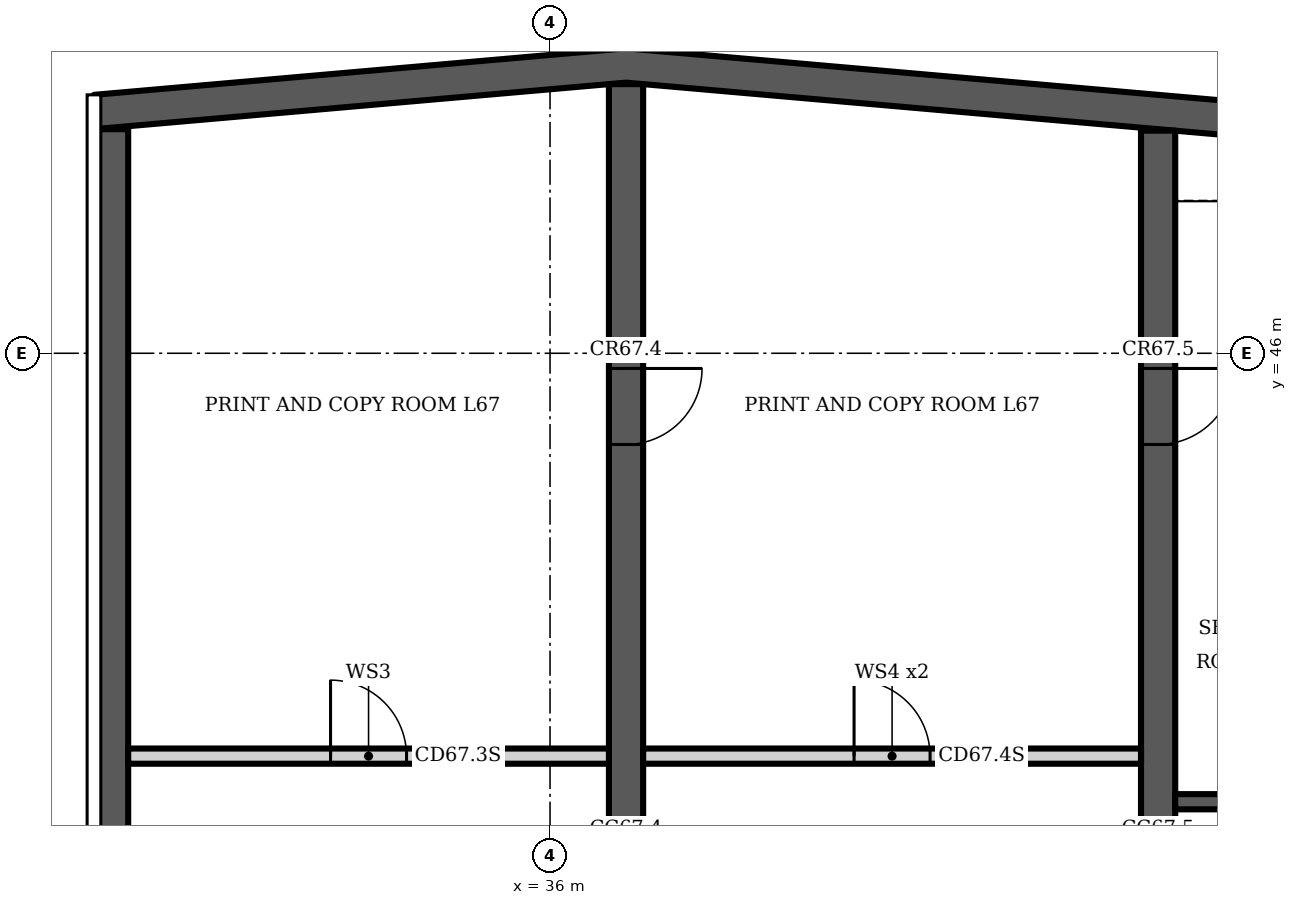
"""IFC4 building model, lengths in metres.
Left out: names, types, materials, properties, quantities, classifications, styles, units other than length and angle.
Written with IfcOpenShell. Run it as: python <this file> out.ifc"""

import sys

from ifc_helpers import new_model, si_unit, direction, frame, frame_2d, origin, place, context, subcontext, project, spatial, polyline, rectangle, outline, extrude, element, fill, save


model = new_model("IFC4")
c1 = context("Model", 3, precision=1e-05, world=origin(), true_north=direction((0.0, 1.0)))
c2 = subcontext(c1, "Body", "Model", "MODEL_VIEW")
j1 = project(units=[si_unit("LENGTHUNIT", "METRE"), si_unit("PLANEANGLEUNIT", "RADIAN")], contexts=[c1])
p1 = place(None, origin())
s1 = spatial("IfcSite", under=j1, at=p1, CompositionType="ELEMENT")
p2 = place(p1, origin())
s2 = spatial("IfcBuilding", under=s1, at=p2, CompositionType="ELEMENT")
p3 = place(p2, frame((0.0, 0.0, 264.3)))
s3 = spatial("IfcBuildingStorey", under=s2, at=p3, CompositionType="ELEMENT", Elevation=264.3)
p4 = place(p3, frame((0.0, 0.0, -0.0)))
e1 = element("IfcWall", 1, at=p4, inside=s3, PredefinedType="SHEAR", context=c2, shape_type="SweptSolid", body=[
    extrude(outline(polyline([(30.0, 48.948), (37.0, 49.561), (51.0, 48.336), (51.0, 48.787), (37.0, 50.012), (30.0, 49.4), (30.0, 48.948)])), origin(), (0.0, 0.0, 1.0), 1.994),
])
p5 = place(p3, frame((30.225, 34.45, 0.0), z_axis=(0.0, 0.0, 1.0), x_axis=(0.0, 1.0, 0.0)))
e2 = element("IfcWall", 2, at=p5, inside=s3, PredefinedType="SHEAR", context=c2, shape_type="SweptSolid", body=[
    extrude(rectangle(XDim=14.498, YDim=0.45, at=frame_2d((7.249, 0.0))), origin(), (0.0, 0.0, 1.0), 2.085),
])
p6 = place(p3, frame((37.0, 34.45, 0.0), z_axis=(0.0, 0.0, 1.0), x_axis=(0.0, 1.0, 0.0)))
e3 = element("IfcWall", 3, at=p6, inside=s3, PredefinedType="SHEAR", context=c2, shape_type="SweptSolid", body=[
    extrude(rectangle(XDim=15.091, YDim=0.45, at=frame_2d((7.545, 0.0))), origin(), (0.0, 0.0, 1.0), 3.2),
])
p7 = place(p6, frame((3.95, 0.0, 0.0)))
e4 = element("IfcOpeningElement", 4, at=p7, cuts=e3, PredefinedType="OPENING", context=c2, shape_type="SweptSolid", body=[
    extrude(rectangle(XDim=1.1, YDim=2.1, at=frame_2d((0.55, 1.05))), frame((0.0, 0.235, 0.0), z_axis=(0.0, -1.0, 0.0), x_axis=(1.0, 0.0, 0.0)), (0.0, 0.0, 1.0), 0.47),
])
p8 = place(p6, frame((10.35, 0.0, 0.0)))
e5 = element("IfcOpeningElement", 5, at=p8, cuts=e3, PredefinedType="OPENING", context=c2, shape_type="SweptSolid", body=[
    extrude(rectangle(XDim=1.0, YDim=2.1, at=frame_2d((0.5, 1.05))), frame((0.0, 0.235, 0.0), z_axis=(0.0, -1.0, 0.0), x_axis=(1.0, 0.0, 0.0)), (0.0, 0.0, 1.0), 0.47),
])
p9 = place(p3, frame((44.0, 34.45, 0.0), z_axis=(0.0, 0.0, 1.0), x_axis=(0.0, 1.0, 0.0)))
e6 = element("IfcWall", 6, at=p9, inside=s3, PredefinedType="SHEAR", context=c2, shape_type="SweptSolid", body=[
    extrude(rectangle(XDim=14.479, YDim=0.45, at=frame_2d((7.239, 0.0))), origin(), (0.0, 0.0, 1.0), 3.2),
])
p10 = place(p9, frame((3.95, 0.0, 0.0)))
e7 = element("IfcOpeningElement", 7, at=p10, cuts=e6, PredefinedType="OPENING", context=c2, shape_type="SweptSolid", body=[
    extrude(rectangle(XDim=1.1, YDim=2.1, at=frame_2d((0.55, 1.05))), frame((0.0, 0.235, 0.0), z_axis=(0.0, -1.0, 0.0), x_axis=(1.0, 0.0, 0.0)), (0.0, 0.0, 1.0), 0.47),
])
p11 = place(p9, frame((10.35, 0.0, 0.0)))
e8 = element("IfcOpeningElement", 8, at=p11, cuts=e6, PredefinedType="OPENING", context=c2, shape_type="SweptSolid", body=[
    extrude(rectangle(XDim=1.0, YDim=2.1, at=frame_2d((0.5, 1.05))), frame((0.0, 0.235, 0.0), z_axis=(0.0, -1.0, 0.0), x_axis=(1.0, 0.0, 0.0)), (0.0, 0.0, 1.0), 0.47),
])
p12 = place(p3, frame((30.45, 40.7, 0.0), z_axis=(0.0, 0.0, 1.0), x_axis=(1.0, 0.0, 0.0)))
e9 = element("IfcWall", 9, at=p12, inside=s3, PredefinedType="PARTITIONING", context=c2, shape_type="SweptSolid", body=[
    extrude(rectangle(XDim=6.325, YDim=0.2, at=frame_2d((3.163, 0.0))), origin(), (0.0, 0.0, 1.0), 2.8),
])
p13 = place(p12, frame((2.663, 0.0, 0.0)))
e10 = element("IfcOpeningElement", 10, at=p13, cuts=e9, PredefinedType="OPENING", context=c2, shape_type="SweptSolid", body=[
    extrude(rectangle(XDim=1.0, YDim=2.1, at=frame_2d((0.5, 1.05))), frame((0.0, 0.11, 0.0), z_axis=(0.0, -1.0, 0.0), x_axis=(1.0, 0.0, 0.0)), (0.0, 0.0, 1.0), 0.22),
])
p14 = place(p3, frame((37.225, 40.7, 0.0), z_axis=(0.0, 0.0, 1.0), x_axis=(1.0, 0.0, 0.0)))
e11 = element("IfcWall", 11, at=p14, inside=s3, PredefinedType="PARTITIONING", context=c2, shape_type="SweptSolid", body=[
    extrude(rectangle(XDim=6.55, YDim=0.2, at=frame_2d((3.275, 0.0))), origin(), (0.0, 0.0, 1.0), 2.8),
])
p15 = place(p14, frame((2.775, 0.0, 0.0)))
e12 = element("IfcOpeningElement", 12, at=p15, cuts=e11, PredefinedType="OPENING", context=c2, shape_type="SweptSolid", body=[
    extrude(rectangle(XDim=1.0, YDim=2.1, at=frame_2d((0.5, 1.05))), frame((0.0, 0.11, 0.0), z_axis=(0.0, -1.0, 0.0), x_axis=(1.0, 0.0, 0.0)), (0.0, 0.0, 1.0), 0.22),
])
p16 = place(p3, frame((44.225, 40.1, 0.0), z_axis=(0.0, 0.0, 1.0), x_axis=(1.0, 0.0, 0.0)))
e13 = element("IfcWall", 13, at=p16, inside=s3, PredefinedType="SHEAR", context=c2, shape_type="SweptSolid", body=[
    extrude(rectangle(XDim=6.325, YDim=0.2, at=frame_2d((3.163, 0.0))), origin(), (0.0, 0.0, 1.0), 2.8),
])
p17 = place(p16, frame((3.7, 0.0, 0.0)))
e14 = element("IfcOpeningElement", 14, at=p17, cuts=e13, PredefinedType="OPENING", context=c2, shape_type="SweptSolid", body=[
    extrude(rectangle(XDim=1.2, YDim=2.1, at=frame_2d((0.6, 1.05))), frame((0.0, 0.11, 0.0), z_axis=(0.0, -1.0, 0.0), x_axis=(1.0, 0.0, 0.0)), (0.0, 0.0, 1.0), 0.22),
])
p18 = place(p16, frame((0.663, 0.0, 0.0)))
e15 = element("IfcOpeningElement", 15, at=p18, cuts=e13, PredefinedType="OPENING", context=c2, shape_type="SweptSolid", body=[
    extrude(rectangle(XDim=0.9, YDim=2.1, at=frame_2d((0.45, 1.05))), frame((0.0, 0.11, 0.0), z_axis=(0.0, -1.0, 0.0), x_axis=(1.0, 0.0, 0.0)), (0.0, 0.0, 1.0), 0.22),
])
p19 = place(p13, origin())
e16 = element("IfcDoor", 16, at=p19, inside=s3, OperationType="SINGLE_SWING_LEFT", PredefinedType="DOOR", context=c2, shape_type="SweptSolid", body=[
    extrude(rectangle(XDim=1.0, YDim=2.1, at=frame_2d((0.5, 1.05))), frame((0.0, 0.025, 0.0), z_axis=(0.0, -1.0, 0.0), x_axis=(1.0, 0.0, 0.0)), (0.0, 0.0, 1.0), 0.05),
])
fill(e10, e16)
p20 = place(p15, origin())
e17 = element("IfcDoor", 17, at=p20, inside=s3, OperationType="SINGLE_SWING_LEFT", PredefinedType="DOOR", context=c2, shape_type="SweptSolid", body=[
    extrude(rectangle(XDim=1.0, YDim=2.1, at=frame_2d((0.5, 1.05))), frame((0.0, 0.025, 0.0), z_axis=(0.0, -1.0, 0.0), x_axis=(1.0, 0.0, 0.0)), (0.0, 0.0, 1.0), 0.05),
])
fill(e12, e17)
p21 = place(p8, origin())
e18 = element("IfcDoor", 18, at=p21, inside=s3, OperationType="SINGLE_SWING_RIGHT", PredefinedType="DOOR", context=c2, shape_type="SweptSolid", body=[
    extrude(rectangle(XDim=1.0, YDim=2.1, at=frame_2d((0.5, 1.05))), frame((0.0, 0.025, 0.0), z_axis=(0.0, -1.0, 0.0), x_axis=(1.0, 0.0, 0.0)), (0.0, 0.0, 1.0), 0.05),
])
fill(e5, e18)
p22 = place(p11, origin())
e19 = element("IfcDoor", 19, at=p22, inside=s3, OperationType="SINGLE_SWING_RIGHT", PredefinedType="DOOR", context=c2, shape_type="SweptSolid", body=[
    extrude(rectangle(XDim=1.0, YDim=2.1, at=frame_2d((0.5, 1.05))), frame((0.0, 0.025, 0.0), z_axis=(0.0, -1.0, 0.0), x_axis=(1.0, 0.0, 0.0)), (0.0, 0.0, 1.0), 0.05),
])
fill(e8, e19)
save(model, sys.argv[1])
